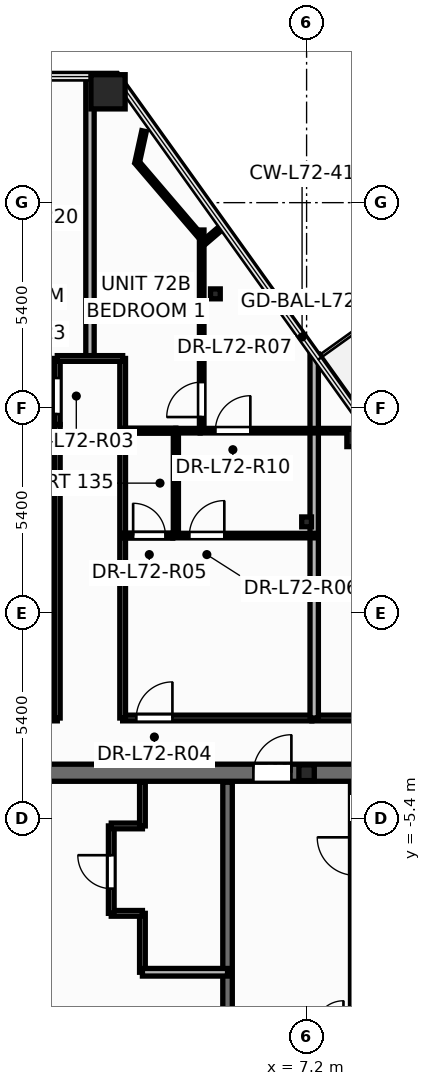
"""IFC4 building model, lengths in metres.
Left out: names, types, materials, properties, quantities, classifications, styles, units other than length and angle.
Written with IfcOpenShell. Run it as: python <this file> out.ifc"""

import sys

from ifc_helpers import new_model, si_unit, direction, frame, frame_2d, origin, origin_2d, place, context, subcontext, project, spatial, rectangle, hollow_rectangle, hollow_circle, i_section, extrude, element, fill, save


model = new_model("IFC4")
c1 = context("Model", 3, precision=1e-05, world=origin(), true_north=direction((0.0, 1.0)))
c2 = subcontext(c1, "Body", "Model", "MODEL_VIEW")
j1 = project(units=[si_unit("LENGTHUNIT", "METRE"), si_unit("PLANEANGLEUNIT", "RADIAN")], contexts=[c1])
p1 = place(None, origin())
s1 = spatial("IfcSite", under=j1, at=p1, CompositionType="ELEMENT")
p2 = place(p1, origin())
s2 = spatial("IfcBuilding", under=s1, at=p2, CompositionType="ELEMENT")
p3 = place(p2, frame((0.0, 0.0, 274.2)))
s3 = spatial("IfcBuildingStorey", under=s2, at=p3, CompositionType="ELEMENT", Elevation=274.2)
p4 = place(p3, frame((1.975, 13.717, 0.0), z_axis=(0.0, 0.0, 1.0), x_axis=(1.0, 0.0, 0.0)))
e1 = element("IfcColumn", 1, at=p4, inside=s3, PredefinedType="COLUMN", context=c2, shape_type="SweptSolid", body=[
    extrude(hollow_rectangle(XDim=0.9, YDim=0.9, WallThickness=0.04, at=origin_2d()), origin(), (0.0, 0.0, 1.0), 3.6),
])
p5 = place(p3, frame((8.489, 4.61, 0.0), z_axis=(0.0, 0.0, 1.0), x_axis=(1.0, 0.0, 0.0)))
e2 = element("IfcColumn", 2, at=p5, inside=s3, PredefinedType="COLUMN", context=c2, shape_type="SweptSolid", body=[
    extrude(hollow_circle(Radius=0.229, WallThickness=0.016, at=origin_2d()), origin(), (0.0, 0.0, 1.0), 3.6),
])
p6 = place(p3, frame((7.2, -4.2, 0.0), z_axis=(0.0, 0.0, 1.0), x_axis=(1.0, 0.0, 0.0)))
e3 = element("IfcColumn", 3, at=p6, inside=s3, PredefinedType="PILASTER", context=c2, shape_type="SweptSolid", body=[
    extrude(i_section(OverallWidth=0.405, OverallDepth=0.414, WebThickness=0.022, FlangeThickness=0.032, at=origin_2d()), origin(), (0.0, 0.0, 1.0), 3.6),
])
for number, where, z_axis, x_axis in (
    (4, (7.2, 2.4, 0.0), (0.0, 0.0, 1.0), (1.0, 0.0, 0.0)),
    (5, (4.8, 8.4, 0.0), (0.0, 0.0, 1.0), (1.0, 0.0, 0.0)),
):
    element("IfcColumn", number, at=place(p3, frame(where, z_axis=z_axis, x_axis=x_axis)), inside=s3, PredefinedType="COLUMN", context=c2, shape_type="SweptSolid", body=[
        extrude(i_section(OverallWidth=0.256, OverallDepth=0.26, WebThickness=0.01, FlangeThickness=0.017, at=origin_2d()), origin(), (0.0, 0.0, 1.0), 3.6),
    ])
p7 = place(p3, frame((2.88, -9.45, 0.0), z_axis=(0.0, 0.0, 1.0), x_axis=(0.0, 1.0, 0.0)))
e6 = element("IfcWall", 6, at=p7, inside=s3, PredefinedType="PARTITIONING", context=c2, shape_type="SweptSolid", body=[
    extrude(rectangle(XDim=1.55, YDim=0.15, at=frame_2d((0.775, 0.0))), origin(), (0.0, 0.0, 1.0), 3.345),
])
p8 = place(p3, frame((2.06, -7.9, 0.0), z_axis=(0.0, 0.0, 1.0), x_axis=(1.0, 0.0, 0.0)))
e7 = element("IfcWall", 7, at=p8, inside=s3, PredefinedType="PARTITIONING", context=c2, shape_type="SweptSolid", body=[
    extrude(rectangle(XDim=0.82, YDim=0.15, at=frame_2d((0.41, 0.0))), origin(), (0.0, 0.0, 1.0), 3.345),
])
p9 = place(p3, frame((2.06, -7.9, 0.0), z_axis=(0.0, 0.0, 1.0), x_axis=(0.0, 1.0, 0.0)))
e8 = element("IfcWall", 8, at=p9, inside=s3, PredefinedType="PARTITIONING", context=c2, shape_type="SweptSolid", body=[
    extrude(rectangle(XDim=2.3, YDim=0.15, at=frame_2d((1.15, 0.0))), origin(), (0.0, 0.0, 1.0), 3.345),
])
p10 = place(p9, frame((0.65, 0.0, 0.0)))
e9 = element("IfcOpeningElement", 9, at=p10, cuts=e8, PredefinedType="OPENING", context=c2, shape_type="SweptSolid", body=[
    extrude(rectangle(XDim=0.886, YDim=2.104, at=frame_2d((0.44, 1.052))), frame((0.0, 0.085, 0.0), z_axis=(0.0, -1.0, 0.0), x_axis=(1.0, 0.0, 0.0)), (0.0, 0.0, 1.0), 0.17),
])
p11 = place(p3, frame((2.06, -5.6, 0.0), z_axis=(0.0, 0.0, 1.0), x_axis=(1.0, 0.0, 0.0)))
e10 = element("IfcWall", 10, at=p11, inside=s3, PredefinedType="PARTITIONING", context=c2, shape_type="SweptSolid", body=[
    extrude(rectangle(XDim=0.82, YDim=0.15, at=frame_2d((0.41, 0.0))), origin(), (0.0, 0.0, 1.0), 3.345),
])
p12 = place(p3, frame((2.88, -5.6, 0.0), z_axis=(0.0, 0.0, 1.0), x_axis=(0.0, 1.0, 0.0)))
e11 = element("IfcWall", 11, at=p12, inside=s3, PredefinedType="PARTITIONING", context=c2, shape_type="SweptSolid", body=[
    extrude(rectangle(XDim=1.15, YDim=0.15, at=frame_2d((0.575, 0.0))), origin(), (0.0, 0.0, 1.0), 3.345),
])
p13 = place(p3, frame((-12.65, -4.2, 0.0), z_axis=(0.0, 0.0, 1.0), x_axis=(1.0, 0.0, 0.0)))
e12 = element("IfcWall", 12, at=p13, inside=s3, PredefinedType="SHEAR", context=c2, shape_type="SweptSolid", body=[
    extrude(rectangle(XDim=25.3, YDim=0.45, at=frame_2d((12.65, 0.0))), origin(), (0.0, 0.0, 1.0), 3.6),
])
p14 = place(p13, frame((1.85, 0.0, 0.0)))
e13 = element("IfcOpeningElement", 13, at=p14, cuts=e12, PredefinedType="OPENING", context=c2, shape_type="SweptSolid", body=[
    extrude(rectangle(XDim=0.756, YDim=2.054, at=frame_2d((0.375, 1.027))), frame((0.0, 0.235, 0.0), z_axis=(0.0, -1.0, 0.0), x_axis=(1.0, 0.0, 0.0)), (0.0, 0.0, 1.0), 0.47),
])
p15 = place(p13, frame((22.65, 0.0, 0.0)))
e14 = element("IfcOpeningElement", 14, at=p15, cuts=e12, PredefinedType="OPENING", context=c2, shape_type="SweptSolid", body=[
    extrude(rectangle(XDim=0.756, YDim=2.054, at=frame_2d((0.375, 1.027))), frame((0.0, 0.235, 0.0), z_axis=(0.0, -1.0, 0.0), x_axis=(1.0, 0.0, 0.0)), (0.0, 0.0, 1.0), 0.47),
])
p16 = place(p13, frame((5.85, 0.0, 0.0)))
e15 = element("IfcOpeningElement", 15, at=p16, cuts=e12, PredefinedType="OPENING", context=c2, shape_type="SweptSolid", body=[
    extrude(rectangle(XDim=1.006, YDim=2.104, at=frame_2d((0.5, 1.052))), frame((0.0, 0.235, 0.0), z_axis=(0.0, -1.0, 0.0), x_axis=(1.0, 0.0, 0.0)), (0.0, 0.0, 1.0), 0.47),
])
p17 = place(p13, frame((10.35, 0.0, 0.0)))
e16 = element("IfcOpeningElement", 16, at=p17, cuts=e12, PredefinedType="OPENING", context=c2, shape_type="SweptSolid", body=[
    extrude(rectangle(XDim=1.406, YDim=2.154, at=frame_2d((0.7, 1.077))), frame((0.0, 0.235, 0.0), z_axis=(0.0, -1.0, 0.0), x_axis=(1.0, 0.0, 0.0)), (0.0, 0.0, 1.0), 0.47),
])
p18 = place(p13, frame((18.45, 0.0, 0.0)))
e17 = element("IfcOpeningElement", 17, at=p18, cuts=e12, PredefinedType="OPENING", context=c2, shape_type="SweptSolid", body=[
    extrude(rectangle(XDim=1.006, YDim=2.104, at=frame_2d((0.5, 1.052))), frame((0.0, 0.235, 0.0), z_axis=(0.0, -1.0, 0.0), x_axis=(1.0, 0.0, 0.0)), (0.0, 0.0, 1.0), 0.47),
])
p19 = place(p3, frame((8.48, -13.85, 0.0), z_axis=(0.0, 0.0, 1.0), x_axis=(0.0, 1.0, 0.0)))
e18 = element("IfcWall", 18, at=p19, inside=s3, PredefinedType="SHEAR", context=c2, shape_type="SweptSolid", body=[
    extrude(rectangle(XDim=9.4, YDim=0.25, at=frame_2d((4.7, 0.0))), origin(), (0.0, 0.0, 1.0), 3.6),
])
p20 = place(p19, frame((6.95, 0.0, 0.0)))
e19 = element("IfcOpeningElement", 19, at=p20, cuts=e18, PredefinedType="OPENING", context=c2, shape_type="SweptSolid", body=[
    extrude(rectangle(XDim=1.006, YDim=2.104, at=frame_2d((0.5, 1.052))), frame((0.0, 0.135, 0.0), z_axis=(0.0, -1.0, 0.0), x_axis=(1.0, 0.0, 0.0)), (0.0, 0.0, 1.0), 0.27),
])
p21 = place(p3, frame((5.12, -13.85, 0.0), z_axis=(0.0, 0.0, 1.0), x_axis=(0.0, 1.0, 0.0)))
e20 = element("IfcWall", 20, at=p21, inside=s3, PredefinedType="SHEAR", context=c2, shape_type="SweptSolid", body=[
    extrude(rectangle(XDim=9.4, YDim=0.25, at=frame_2d((4.7, 0.0))), origin(), (0.0, 0.0, 1.0), 3.6),
])
p22 = place(p3, frame((2.88, -9.45, 0.0), z_axis=(0.0, 0.0, 1.0), x_axis=(1.0, 0.0, 0.0)))
e21 = element("IfcWall", 21, at=p22, inside=s3, PredefinedType="SOLIDWALL", context=c2, shape_type="SweptSolid", body=[
    extrude(rectangle(XDim=2.24, YDim=0.2, at=frame_2d((1.12, 0.0))), origin(), (0.0, 0.0, 1.0), 3.345),
])
p23 = place(p3, frame((-14.251, -2.76, 0.0), z_axis=(0.0, 0.0, 1.0), x_axis=(1.0, 0.0, 0.0)))
e22 = element("IfcWall", 22, at=p23, inside=s3, PredefinedType="PARTITIONING", context=c2, shape_type="SweptSolid", body=[
    extrude(rectangle(XDim=14.891, YDim=0.15, at=frame_2d((7.446, 0.0))), origin(), (0.0, 0.0, 1.0), 2.32),
])
p24 = place(p23, frame((3.39, 0.0, 0.0)))
e23 = element("IfcOpeningElement", 23, at=p24, cuts=e22, PredefinedType="OPENING", context=c2, shape_type="SweptSolid", body=[
    extrude(rectangle(XDim=0.956, YDim=2.104, at=frame_2d((0.475, 1.052))), frame((0.0, 0.085, 0.0), z_axis=(0.0, -1.0, 0.0), x_axis=(1.0, 0.0, 0.0)), (0.0, 0.0, 1.0), 0.17),
])
p25 = place(p3, frame((-8.773, 4.9, 0.0), z_axis=(0.0, 0.0, 1.0), x_axis=(1.0, 0.0, 0.0)))
e24 = element("IfcWall", 24, at=p25, inside=s3, PredefinedType="PARTITIONING", context=c2, shape_type="SweptSolid", body=[
    extrude(rectangle(XDim=9.413, YDim=0.12, at=frame_2d((4.706, 0.0))), origin(), (0.0, 0.0, 1.0), 2.32),
])
p26 = place(p3, frame((0.64, -2.76, 0.0), z_axis=(0.0, 0.0, 1.0), x_axis=(0.0, 1.0, 0.0)))
e25 = element("IfcWall", 25, at=p26, inside=s3, PredefinedType="PARTITIONING", context=c2, shape_type="SweptSolid", body=[
    extrude(rectangle(XDim=7.72, YDim=0.15, at=frame_2d((3.86, 0.0))), origin(), (0.0, 0.0, 1.0), 2.32),
])
p27 = place(p3, frame((1.5, 6.7, 0.0), z_axis=(0.0, 0.0, 1.0), x_axis=(0.0, 1.0, 0.0)))
e26 = element("IfcWall", 26, at=p27, inside=s3, PredefinedType="PARTITIONING", context=c2, shape_type="SweptSolid", body=[
    extrude(rectangle(XDim=7.417, YDim=0.22, at=frame_2d((3.708, 0.0))), origin(), (0.0, 0.0, 1.0), 2.32),
])
p28 = place(p3, frame((7.34, -2.76, 0.0), z_axis=(0.0, 0.0, 1.0), x_axis=(1.0, 0.0, 0.0)))
e27 = element("IfcWall", 27, at=p28, inside=s3, PredefinedType="PARTITIONING", context=c2, shape_type="SweptSolid", body=[
    extrude(rectangle(XDim=6.911, YDim=0.15, at=frame_2d((3.456, 0.0))), origin(), (0.0, 0.0, 1.0), 2.32),
])
p29 = place(p28, frame((1.43, 0.0, 0.0)))
e28 = element("IfcOpeningElement", 28, at=p29, cuts=e27, PredefinedType="OPENING", context=c2, shape_type="SweptSolid", body=[
    extrude(rectangle(XDim=0.956, YDim=2.104, at=frame_2d((0.475, 1.052))), frame((0.0, 0.085, 0.0), z_axis=(0.0, -1.0, 0.0), x_axis=(1.0, 0.0, 0.0)), (0.0, 0.0, 1.0), 0.17),
])
p30 = place(p3, frame((4.44, 4.8, 0.0), z_axis=(0.0, 0.0, 1.0), x_axis=(0.0, 1.0, 0.0)))
e29 = element("IfcWall", 29, at=p30, inside=s3, PredefinedType="PARTITIONING", context=c2, shape_type="SweptSolid", body=[
    extrude(rectangle(XDim=5.28, YDim=0.12, at=frame_2d((2.64, 0.0))), origin(), (0.0, 0.0, 1.0), 2.32),
])
p31 = place(p30, frame((0.359, 0.0, 0.0)))
e30 = element("IfcOpeningElement", 30, at=p31, cuts=e29, PredefinedType="OPENING", context=c2, shape_type="SweptSolid", body=[
    extrude(rectangle(XDim=0.926, YDim=2.104, at=frame_2d((0.46, 1.052))), frame((0.0, 0.07, 0.0), z_axis=(0.0, -1.0, 0.0), x_axis=(1.0, 0.0, 0.0)), (0.0, 0.0, 1.0), 0.14),
])
p32 = place(p3, frame((2.36, -2.76, 0.0), z_axis=(0.0, 0.0, 1.0), x_axis=(1.0, 0.0, 0.0)))
e31 = element("IfcWall", 31, at=p32, inside=s3, PredefinedType="PARTITIONING", context=c2, shape_type="SweptSolid", body=[
    extrude(rectangle(XDim=4.978, YDim=0.15, at=frame_2d((2.489, 0.0))), origin(), (0.0, 0.0, 1.0), 2.32),
])
p33 = place(p32, frame((0.359, 0.0, 0.0)))
e32 = element("IfcOpeningElement", 32, at=p33, cuts=e31, PredefinedType="OPENING", context=c2, shape_type="SweptSolid", body=[
    extrude(rectangle(XDim=0.956, YDim=2.104, at=frame_2d((0.475, 1.052))), frame((0.0, 0.085, 0.0), z_axis=(0.0, -1.0, 0.0), x_axis=(1.0, 0.0, 0.0)), (0.0, 0.0, 1.0), 0.17),
])
p34 = place(p3, frame((2.36, -2.76, 0.0), z_axis=(0.0, 0.0, 1.0), x_axis=(0.0, 1.0, 0.0)))
e33 = element("IfcWall", 33, at=p34, inside=s3, PredefinedType="PARTITIONING", context=c2, shape_type="SweptSolid", body=[
    extrude(rectangle(XDim=9.46, YDim=0.15, at=frame_2d((4.73, 0.0))), origin(), (0.0, 0.0, 1.0), 2.32),
])
p35 = place(p3, frame((7.4, -2.76, 0.0), z_axis=(0.0, 0.0, 1.0), x_axis=(0.0, 1.0, 0.0)))
e34 = element("IfcWall", 34, at=p35, inside=s3, PredefinedType="PARTITIONING", context=c2, shape_type="SweptSolid", body=[
    extrude(rectangle(XDim=9.579, YDim=0.22, at=frame_2d((4.79, 0.0))), origin(), (0.0, 0.0, 1.0), 2.32),
])
p36 = place(p3, frame((4.4, 4.8, 0.0), z_axis=(0.0, 0.0, 1.0), x_axis=(1.0, 0.0, 0.0)))
e35 = element("IfcWall", 35, at=p36, inside=s3, PredefinedType="PARTITIONING", context=c2, shape_type="SweptSolid", body=[
    extrude(rectangle(XDim=4.444, YDim=0.12, at=frame_2d((2.222, 0.0))), origin(), (0.0, 0.0, 1.0), 2.32),
])
p37 = place(p36, frame((0.4, 0.0, 0.0)))
e36 = element("IfcOpeningElement", 36, at=p37, cuts=e35, PredefinedType="OPENING", context=c2, shape_type="SweptSolid", body=[
    extrude(rectangle(XDim=0.926, YDim=2.104, at=frame_2d((0.46, 1.052))), frame((0.0, 0.07, 0.0), z_axis=(0.0, -1.0, 0.0), x_axis=(1.0, 0.0, 0.0)), (0.0, 0.0, 1.0), 0.14),
])
p38 = place(p3, frame((3.68, 2.04, 0.0), z_axis=(0.0, 0.0, 1.0), x_axis=(1.0, 0.0, 0.0)))
e37 = element("IfcWall", 37, at=p38, inside=s3, PredefinedType="PARTITIONING", context=c2, shape_type="SweptSolid", body=[
    extrude(rectangle(XDim=3.72, YDim=0.12, at=frame_2d((1.86, 0.0))), origin(), (0.0, 0.0, 1.0), 2.32),
])
p39 = place(p38, frame((0.435, 0.0, 0.0)))
e38 = element("IfcOpeningElement", 38, at=p39, cuts=e37, PredefinedType="OPENING", context=c2, shape_type="SweptSolid", body=[
    extrude(rectangle(XDim=0.926, YDim=2.104, at=frame_2d((0.46, 1.052))), frame((0.0, 0.07, 0.0), z_axis=(0.0, -1.0, 0.0), x_axis=(1.0, 0.0, 0.0)), (0.0, 0.0, 1.0), 0.14),
])
p40 = place(p3, frame((3.76, 2.04, 0.0), z_axis=(0.0, 0.0, 1.0), x_axis=(0.0, 1.0, 0.0)))
e39 = element("IfcWall", 39, at=p40, inside=s3, PredefinedType="PARTITIONING", context=c2, shape_type="SweptSolid", body=[
    extrude(rectangle(XDim=2.76, YDim=0.135, at=frame_2d((1.38, 0.0))), origin(), (0.0, 0.0, 1.0), 2.32),
])
p41 = place(p3, frame((4.524, 9.771, 0.0), z_axis=(0.0, 0.0, 1.0), x_axis=(-0.649984417987, 0.759947535277, 0.0)))
e40 = element("IfcWall", 40, at=p41, inside=s3, PredefinedType="PARTITIONING", context=c2, shape_type="SweptSolid", body=[
    extrude(rectangle(XDim=2.742, YDim=0.12, at=frame_2d((1.371, 0.0))), origin(), (0.0, 0.0, 1.0), 2.32),
])
p42 = place(p3, frame((0.64, 4.962, 0.0), z_axis=(0.0, 0.0, 1.0), x_axis=(0.0, 1.0, 0.0)))
e41 = element("IfcWall", 41, at=p42, inside=s3, PredefinedType="PARTITIONING", context=c2, shape_type="SweptSolid", body=[
    extrude(rectangle(XDim=1.738, YDim=0.15, at=frame_2d((0.869, 0.0))), origin(), (0.0, 0.0, 1.0), 3.345),
])
p43 = place(p42, frame((0.274, 0.0, 0.0)))
e42 = element("IfcOpeningElement", 42, at=p43, cuts=e41, PredefinedType="OPENING", context=c2, shape_type="SweptSolid", body=[
    extrude(rectangle(XDim=0.956, YDim=2.104, at=frame_2d((0.475, 1.052))), frame((0.0, 0.085, 0.0), z_axis=(0.0, -1.0, 0.0), x_axis=(1.0, 0.0, 0.0)), (0.0, 0.0, 1.0), 0.17),
])
p44 = place(p3, frame((2.36, 2.04, 0.0), z_axis=(0.0, 0.0, 1.0), x_axis=(1.0, 0.0, 0.0)))
e43 = element("IfcWall", 43, at=p44, inside=s3, PredefinedType="PARTITIONING", context=c2, shape_type="SweptSolid", body=[
    extrude(rectangle(XDim=1.318, YDim=0.135, at=frame_2d((0.659, 0.0))), origin(), (0.0, 0.0, 1.0), 2.964),
])
p45 = place(p44, frame((0.276, 0.0, 0.0)))
e44 = element("IfcOpeningElement", 44, at=p45, cuts=e43, PredefinedType="OPENING", context=c2, shape_type="SweptSolid", body=[
    extrude(rectangle(XDim=0.856, YDim=2.104, at=frame_2d((0.425, 1.052))), frame((0.0, 0.078, 0.0), z_axis=(0.0, -1.0, 0.0), x_axis=(1.0, 0.0, 0.0)), (0.0, 0.0, 1.0), 0.155),
])
p46 = place(p3, frame((2.36, 4.8, 0.0), z_axis=(0.0, 0.0, 1.0), x_axis=(1.0, 0.0, 0.0)))
e45 = element("IfcWall", 45, at=p46, inside=s3, PredefinedType="PARTITIONING", context=c2, shape_type="SweptSolid", body=[
    extrude(rectangle(XDim=1.4, YDim=0.135, at=frame_2d((0.7, 0.0))), origin(), (0.0, 0.0, 1.0), 2.964),
])
p47 = place(p3, frame((0.64, 6.7, 0.0), z_axis=(0.0, 0.0, 1.0), x_axis=(1.0, 0.0, 0.0)))
e46 = element("IfcWall", 46, at=p47, inside=s3, PredefinedType="PARTITIONING", context=c2, shape_type="SweptSolid", body=[
    extrude(rectangle(XDim=1.72, YDim=0.15, at=frame_2d((0.86, 0.0))), origin(), (0.0, 0.0, 1.0), 2.964),
])
p48 = place(p3, frame((2.741, 11.855, 0.0), z_axis=(0.0, 0.0, 1.0), x_axis=(0.213963823388, 0.976841585049, 0.0)))
e47 = element("IfcWall", 47, at=p48, inside=s3, PredefinedType="PARTITIONING", context=c2, shape_type="SweptSolid", body=[
    extrude(rectangle(XDim=0.845, YDim=0.12, at=frame_2d((0.423, 0.0))), origin(), (0.0, 0.0, 1.0), 2.32),
])
p49 = place(p3, frame((3.76, 4.8, 0.0), z_axis=(0.0, 0.0, 1.0), x_axis=(1.0, 0.0, 0.0)))
e48 = element("IfcWall", 48, at=p49, inside=s3, PredefinedType="PARTITIONING", context=c2, shape_type="SweptSolid", body=[
    extrude(rectangle(XDim=0.638, YDim=0.12, at=frame_2d((0.319, 0.0))), origin(), (0.0, 0.0, 1.0), 3.345),
])
p50 = place(p3, frame((4.991, 10.171, 0.0), z_axis=(0.0, 0.0, 1.0), x_axis=(-0.759789025065, -0.650169698918, 0.0)))
e49 = element("IfcWall", 49, at=p50, inside=s3, PredefinedType="PARTITIONING", context=c2, shape_type="SweptSolid", body=[
    extrude(rectangle(XDim=0.615, YDim=0.12, at=frame_2d((0.307, 0.0))), origin(), (0.0, 0.0, 1.0), 2.863),
])
p51 = place(p10, origin())
e50 = element("IfcDoor", 50, at=p51, inside=s3, OperationType="SINGLE_SWING_RIGHT", PredefinedType="DOOR", context=c2, shape_type="SweptSolid", body=[
    extrude(rectangle(XDim=0.88, YDim=2.1, at=frame_2d((0.44, 1.05))), frame((0.0, 0.025, 0.0), z_axis=(0.0, -1.0, 0.0), x_axis=(1.0, 0.0, 0.0)), (0.0, 0.0, 1.0), 0.05),
])
fill(e9, e50)
p52 = place(p18, origin())
e51 = element("IfcDoor", 51, at=p52, inside=s3, OperationType="SINGLE_SWING_RIGHT", PredefinedType="DOOR", context=c2, shape_type="SweptSolid", body=[
    extrude(rectangle(XDim=1.0, YDim=2.1, at=frame_2d((0.5, 1.05))), frame((0.0, 0.025, 0.0), z_axis=(0.0, -1.0, 0.0), x_axis=(1.0, 0.0, 0.0)), (0.0, 0.0, 1.0), 0.05),
])
fill(e17, e51)
p53 = place(p43, origin())
e52 = element("IfcDoor", 52, at=p53, inside=s3, OperationType="SINGLE_SWING_LEFT", PredefinedType="DOOR", context=c2, shape_type="SweptSolid", body=[
    extrude(rectangle(XDim=0.95, YDim=2.1, at=frame_2d((0.475, 1.05))), frame((0.0, 0.025, 0.0), z_axis=(0.0, -1.0, 0.0), x_axis=(1.0, 0.0, 0.0)), (0.0, 0.0, 1.0), 0.05),
])
fill(e42, e52)
p54 = place(p33, origin())
e53 = element("IfcDoor", 53, at=p54, inside=s3, OperationType="SINGLE_SWING_RIGHT", PredefinedType="DOOR", context=c2, shape_type="SweptSolid", body=[
    extrude(rectangle(XDim=0.95, YDim=2.1, at=frame_2d((0.475, 1.05))), frame((0.0, 0.025, 0.0), z_axis=(0.0, -1.0, 0.0), x_axis=(1.0, 0.0, 0.0)), (0.0, 0.0, 1.0), 0.05),
])
fill(e32, e53)
p55 = place(p45, origin())
e54 = element("IfcDoor", 54, at=p55, inside=s3, OperationType="SINGLE_SWING_LEFT", PredefinedType="DOOR", context=c2, shape_type="SweptSolid", body=[
    extrude(rectangle(XDim=0.85, YDim=2.1, at=frame_2d((0.425, 1.05))), frame((0.0, 0.025, 0.0), z_axis=(0.0, -1.0, 0.0), x_axis=(1.0, 0.0, 0.0)), (0.0, 0.0, 1.0), 0.05),
])
fill(e44, e54)
p56 = place(p39, origin())
e55 = element("IfcDoor", 55, at=p56, inside=s3, OperationType="SINGLE_SWING_RIGHT", PredefinedType="DOOR", context=c2, shape_type="SweptSolid", body=[
    extrude(rectangle(XDim=0.92, YDim=2.1, at=frame_2d((0.46, 1.05))), frame((0.0, 0.025, 0.0), z_axis=(0.0, -1.0, 0.0), x_axis=(1.0, 0.0, 0.0)), (0.0, 0.0, 1.0), 0.05),
])
fill(e38, e55)
p57 = place(p31, origin())
e56 = element("IfcDoor", 56, at=p57, inside=s3, OperationType="SINGLE_SWING_LEFT", PredefinedType="DOOR", context=c2, shape_type="SweptSolid", body=[
    extrude(rectangle(XDim=0.92, YDim=2.1, at=frame_2d((0.46, 1.05))), frame((0.0, 0.025, 0.0), z_axis=(0.0, -1.0, 0.0), x_axis=(1.0, 0.0, 0.0)), (0.0, 0.0, 1.0), 0.05),
])
fill(e30, e56)
p58 = place(p37, origin())
e57 = element("IfcDoor", 57, at=p58, inside=s3, OperationType="SINGLE_SWING_RIGHT", PredefinedType="DOOR", context=c2, shape_type="SweptSolid", body=[
    extrude(rectangle(XDim=0.92, YDim=2.1, at=frame_2d((0.46, 1.05))), frame((0.0, 0.025, 0.0), z_axis=(0.0, -1.0, 0.0), x_axis=(1.0, 0.0, 0.0)), (0.0, 0.0, 1.0), 0.05),
])
fill(e36, e57)
save(model, sys.argv[1])
